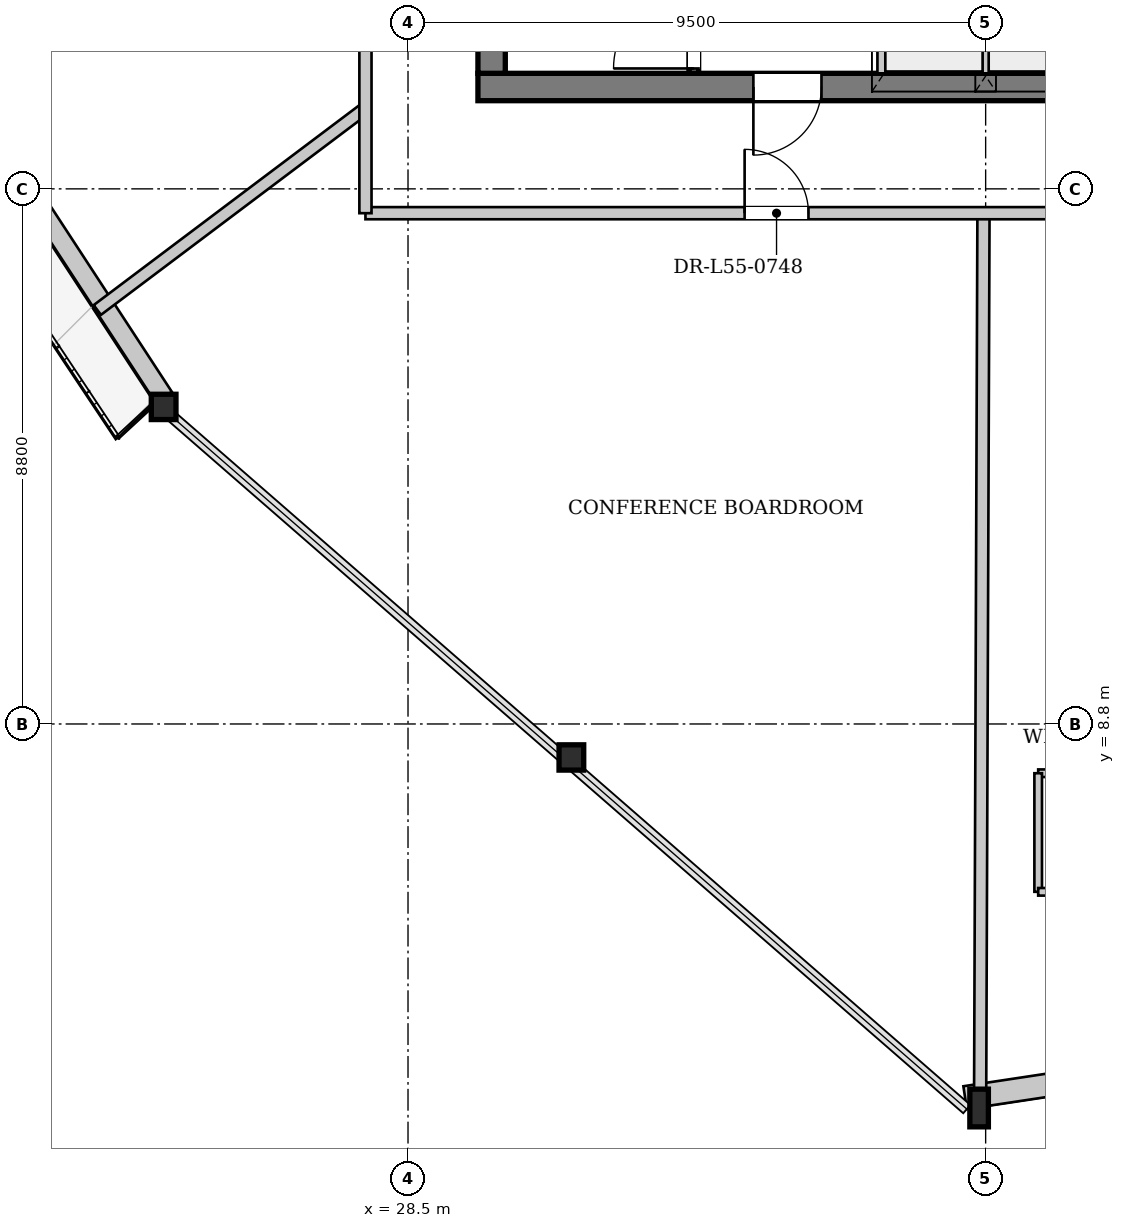
"""IFC4 building model, lengths in metres.
Left out: names, types, materials, properties, quantities, classifications, styles, units other than length and angle.
Written with IfcOpenShell. Run it as: python <this file> out.ifc"""

import sys

from ifc_helpers import new_model, si_unit, direction, frame, frame_2d, origin, origin_2d, place, context, subcontext, project, spatial, rectangle, i_section, extrude, source, transform, mapped, element, fill, save


model = new_model("IFC4")
c1 = context("Model", 3, precision=1e-05, world=origin(), true_north=direction((0.0, 1.0)))
c2 = subcontext(c1, "Body", "Model", "MODEL_VIEW")
j1 = project(units=[si_unit("LENGTHUNIT", "METRE"), si_unit("PLANEANGLEUNIT", "RADIAN")], contexts=[c1])
p1 = place(None, origin())
s1 = spatial("IfcSite", under=j1, at=p1, CompositionType="ELEMENT")
p2 = place(p1, origin())
s2 = spatial("IfcBuilding", under=s1, at=p2, CompositionType="ELEMENT")
p3 = place(p2, frame((0.0, 0.0, 209.6)))
s3 = spatial("IfcBuildingStorey", under=s2, at=p3, CompositionType="ELEMENT", Elevation=209.6)
m1 = source(origin(), c2, "Body", "SweptSolid", [
    extrude(i_section(OverallWidth=0.406, OverallDepth=0.416, WebThickness=0.027, FlangeThickness=0.042, at=origin_2d()), origin(), (0.0, 0.0, 1.0), 3.399),
])
p4 = place(p3, frame((24.347, 14.088, 0.0), z_axis=(0.078726710001, -0.043745042327, 0.995935980073), x_axis=(0.485710646607, 0.874119653007, 0.0)))
e1 = element("IfcColumn", 1, at=p4, inside=s3, PredefinedType="COLUMN", context=c2, shape_type="MappedRepresentation", body=[
    mapped(m1, transform((0.0, 0.0, 0.0), x_axis=(1.0, 0.0, 0.0), y_axis=(0.0, 1.0, 0.0), z_axis=(0.0, 0.0, 1.0), scale=1.0)),
])
m2 = source(origin(), c2, "Body", "SweptSolid", [
    extrude(i_section(OverallWidth=0.406, OverallDepth=0.416, WebThickness=0.027, FlangeThickness=0.042, at=origin_2d()), origin(), (0.0, 0.0, 1.0), 3.402),
])
p5 = place(p3, frame((31.019, 8.278, 0.0), z_axis=(0.098672919306, -0.016577050443, 0.994981837218), x_axis=(0.1656782175, 0.986179866072, 0.0)))
e2 = element("IfcColumn", 2, at=p5, inside=s3, PredefinedType="COLUMN", context=c2, shape_type="MappedRepresentation", body=[
    mapped(m2, transform((0.0, 0.0, 0.0), x_axis=(1.0, 0.0, 0.0), y_axis=(0.0, 1.0, 0.0), z_axis=(0.0, 0.0, 1.0), scale=1.0)),
])
m3 = source(origin(), c2, "Body", "SweptSolid", [
    extrude(i_section(OverallWidth=0.305, OverallDepth=0.62, WebThickness=0.021, FlangeThickness=0.04, at=origin_2d()), origin(), (0.0, 0.0, 1.0), 3.409),
])
p6 = place(p3, frame((37.691, 2.467, 0.0), z_axis=(0.118446662085, 0.010598613052, 0.992903851157), x_axis=(-0.089123966209, 0.996020541278, 0.0)))
e3 = element("IfcColumn", 3, at=p6, inside=s3, PredefinedType="COLUMN", context=c2, shape_type="MappedRepresentation", body=[
    mapped(m3, transform((0.0, 0.0, 0.0), x_axis=(1.0, 0.0, 0.0), y_axis=(0.0, 1.0, 0.0), z_axis=(0.0, 0.0, 1.0), scale=1.0)),
])
p7 = place(p3, frame((41.551, 3.243, 0.0), z_axis=(0.0, 0.0, 1.0), x_axis=(-0.988756700012, -0.149533234373, 0.0)))
e4 = element("IfcWall", 4, at=p7, inside=s3, PredefinedType="SOLIDWALL", context=c2, shape_type="SweptSolid", body=[
    extrude(rectangle(XDim=3.933, YDim=0.38, at=frame_2d((1.967, 0.0))), origin(), (0.0, 0.0, 1.0), 2.822),
])
p8 = place(p3, frame((24.481, 14.176, 0.0), z_axis=(0.0, 0.0, 1.0), x_axis=(-0.546955288252, 0.837161819873, 0.0)))
e5 = element("IfcWall", 5, at=p8, inside=s3, PredefinedType="SOLIDWALL", context=c2, shape_type="SweptSolid", body=[
    extrude(rectangle(XDim=17.695, YDim=0.32, at=frame_2d((8.848, 0.0))), origin(), (0.0, 0.0, 1.0), 2.822),
])
p9 = place(p8, frame((4.912, 0.0, 0.0)))
e6 = element("IfcOpeningElement", 6, at=p9, cuts=e5, PredefinedType="OPENING", context=c2, shape_type="SweptSolid", body=[
    extrude(rectangle(XDim=1.5, YDim=2.3, at=frame_2d((0.75, 1.15))), frame((0.0, 0.17, 0.0), z_axis=(0.0, -1.0, 0.0), x_axis=(1.0, 0.0, 0.0)), (0.0, 0.0, 1.0), 0.34),
])
p10 = place(p8, frame((11.794, 0.0, 0.352)))
e7 = element("IfcOpeningElement", 7, at=p10, cuts=e5, PredefinedType="OPENING", context=c2, shape_type="SweptSolid", body=[
    extrude(rectangle(XDim=2.6, YDim=2.35, at=frame_2d((1.3, 1.175))), frame((0.0, 0.17, 0.0), z_axis=(0.0, -1.0, 0.0), x_axis=(1.0, 0.0, 0.0)), (0.0, 0.0, 1.0), 0.34),
])
p11 = place(p3, frame((46.35, 19.275, 0.0), z_axis=(0.0, 0.0, 1.0), x_axis=(-1.0, 0.0, 0.0)))
e8 = element("IfcWall", 8, at=p11, inside=s3, PredefinedType="SHEAR", context=c2, shape_type="SweptSolid", body=[
    extrude(rectangle(XDim=16.7, YDim=0.45, at=frame_2d((8.35, 0.0))), origin(), (0.0, 0.0, 1.0), 3.33),
])
p12 = place(p11, frame((4.55, 0.0, 0.0)))
e9 = element("IfcOpeningElement", 9, at=p12, cuts=e8, PredefinedType="OPENING", context=c2, shape_type="SweptSolid", body=[
    extrude(rectangle(XDim=1.12, YDim=2.25, at=frame_2d((0.56, 1.125))), frame((0.0, 0.235, 0.0), z_axis=(0.0, -1.0, 0.0), x_axis=(1.0, 0.0, 0.0)), (0.0, 0.0, 1.0), 0.47),
])
p13 = place(p11, frame((11.05, 0.0, 0.0)))
e10 = element("IfcOpeningElement", 10, at=p13, cuts=e8, PredefinedType="OPENING", context=c2, shape_type="SweptSolid", body=[
    extrude(rectangle(XDim=1.12, YDim=2.25, at=frame_2d((0.56, 1.125))), frame((0.0, 0.235, 0.0), z_axis=(0.0, -1.0, 0.0), x_axis=(1.0, 0.0, 0.0)), (0.0, 0.0, 1.0), 0.47),
])
p14 = place(p3, frame((29.875, 19.5, 0.0), z_axis=(0.0, 0.0, 1.0), x_axis=(0.0, 1.0, 0.0)))
e11 = element("IfcWall", 11, at=p14, inside=s3, PredefinedType="SHEAR", context=c2, shape_type="SweptSolid", body=[
    extrude(rectangle(XDim=14.2, YDim=0.45, at=frame_2d((7.1, 0.0))), origin(), (0.0, 0.0, 1.0), 3.33),
])
p15 = place(p14, frame((7.42, 0.0, 0.0)))
e12 = element("IfcOpeningElement", 12, at=p15, cuts=e11, PredefinedType="OPENING", context=c2, shape_type="SweptSolid", body=[
    extrude(rectangle(XDim=1.6, YDim=2.2, at=frame_2d((0.8, 1.1))), frame((0.0, 0.235, 0.0), z_axis=(0.0, -1.0, 0.0), x_axis=(1.0, 0.0, 0.0)), (0.0, 0.0, 1.0), 0.47),
])
p16 = place(p3, frame((33.2, 19.5, 0.0), z_axis=(0.0, 0.0, 1.0), x_axis=(0.0, 1.0, 0.0)))
e13 = element("IfcWall", 13, at=p16, inside=s3, PredefinedType="PARTITIONING", context=c2, shape_type="SweptSolid", body=[
    extrude(rectangle(XDim=7.46, YDim=0.16, at=frame_2d((3.73, 0.0))), origin(), (0.0, 0.0, 1.0), 3.33),
])
p17 = place(p16, frame((0.08, 0.0, 0.0)))
e14 = element("IfcOpeningElement", 14, at=p17, cuts=e13, PredefinedType="OPENING", context=c2, shape_type="SweptSolid", body=[
    extrude(rectangle(XDim=1.32, YDim=2.2, at=frame_2d((0.66, 1.1))), frame((0.0, 0.09, 0.0), z_axis=(0.0, -1.0, 0.0), x_axis=(1.0, 0.0, 0.0)), (0.0, 0.0, 1.0), 0.18),
])
p18 = place(p3, frame((36.3, 19.5, 0.0), z_axis=(0.0, 0.0, 1.0), x_axis=(0.0, 1.0, 0.0)))
e15 = element("IfcWall", 15, at=p18, inside=s3, PredefinedType="PARTITIONING", context=c2, shape_type="SweptSolid", body=[
    extrude(rectangle(XDim=4.78, YDim=0.16, at=frame_2d((2.39, 0.0))), origin(), (0.0, 0.0, 1.0), 3.33),
])
p19 = place(p18, frame((0.6, 0.0, 0.0)))
e16 = element("IfcOpeningElement", 16, at=p19, cuts=e15, PredefinedType="OPENING", context=c2, shape_type="SweptSolid", body=[
    extrude(rectangle(XDim=1.2, YDim=2.2, at=frame_2d((0.6, 1.1))), frame((0.0, 0.09, 0.0), z_axis=(0.0, -1.0, 0.0), x_axis=(1.0, 0.0, 0.0)), (0.0, 0.0, 1.0), 0.18),
])
p20 = place(p18, frame((2.65, 0.0, 0.0)))
e17 = element("IfcOpeningElement", 17, at=p20, cuts=e15, PredefinedType="OPENING", context=c2, shape_type="SweptSolid", body=[
    extrude(rectangle(XDim=0.95, YDim=2.1, at=frame_2d((0.475, 1.05))), frame((0.0, 0.09, 0.0), z_axis=(0.0, -1.0, 0.0), x_axis=(1.0, 0.0, 0.0)), (0.0, 0.0, 1.0), 0.18),
])
p21 = place(p3, frame((38.0, 19.5, 0.0), z_axis=(0.0, 0.0, 1.0), x_axis=(0.0, 1.0, 0.0)))
e18 = element("IfcWall", 18, at=p21, inside=s3, PredefinedType="PARTITIONING", context=c2, shape_type="SweptSolid", body=[
    extrude(rectangle(XDim=2.46, YDim=0.125, at=frame_2d((1.23, 0.0))), origin(), (0.0, 0.0, 1.0), 3.33),
])
p22 = place(p3, frame((27.8, 18.926, 0.0), z_axis=(0.0, 0.0, 1.0), x_axis=(-0.799112551023, -0.60118144582, 0.0)))
e19 = element("IfcWall", 19, at=p22, inside=s3, PredefinedType="PARTITIONING", context=c2, shape_type="SweptSolid", body=[
    extrude(rectangle(XDim=5.519, YDim=0.2, at=frame_2d((2.759, 0.0))), origin(), (0.0, 0.0, 1.0), 3.33),
])
p23 = place(p3, frame((37.964, 17.2, 0.0), z_axis=(0.0, 0.0, 1.0), x_axis=(-0.003794344368, -0.999992801449, 0.0)))
e20 = element("IfcWall", 20, at=p23, inside=s3, PredefinedType="PARTITIONING", context=c2, shape_type="SweptSolid", body=[
    extrude(rectangle(XDim=14.67, YDim=0.2, at=frame_2d((7.335, 0.0))), origin(), (0.0, 0.0, 1.0), 2.925),
])
p24 = place(p3, frame((41.264, 7.99, 0.0), z_axis=(0.0, 0.0, 1.0), x_axis=(-1.0, 0.0, 0.0)))
e21 = element("IfcWall", 21, at=p24, inside=s3, PredefinedType="PARTITIONING", context=c2, shape_type="SweptSolid", body=[
    extrude(rectangle(XDim=2.4, YDim=0.125, at=frame_2d((1.2, 0.0))), origin(), (0.0, 0.0, 1.0), 3.33),
])
p25 = place(p3, frame((38.864, 7.99, 0.0), z_axis=(0.0, 0.0, 1.0), x_axis=(0.0, -1.0, 0.0)))
e22 = element("IfcWall", 22, at=p25, inside=s3, PredefinedType="PARTITIONING", context=c2, shape_type="SweptSolid", body=[
    extrude(rectangle(XDim=1.95, YDim=0.125, at=frame_2d((0.975, 0.0))), origin(), (0.0, 0.0, 1.0), 3.33),
])
p26 = place(p3, frame((38.864, 6.04, 0.0), z_axis=(0.0, 0.0, 1.0), x_axis=(1.0, 0.0, 0.0)))
e23 = element("IfcWall", 23, at=p26, inside=s3, PredefinedType="PARTITIONING", context=c2, shape_type="SweptSolid", body=[
    extrude(rectangle(XDim=2.4, YDim=0.125, at=frame_2d((1.2, 0.0))), origin(), (0.0, 0.0, 1.0), 3.33),
])
p27 = place(p3, frame((27.8, 17.2, 0.0), z_axis=(0.0, 0.0, 1.0), x_axis=(1.0, 0.0, 0.0)))
e24 = element("IfcWall", 24, at=p27, inside=s3, PredefinedType="PARTITIONING", context=c2, shape_type="SweptSolid", body=[
    extrude(rectangle(XDim=20.4, YDim=0.2, at=frame_2d((10.2, 0.0))), origin(), (0.0, 0.0, 1.0), 3.33),
])
p28 = place(p27, frame((19.05, 0.0, 0.0)))
e25 = element("IfcOpeningElement", 25, at=p28, cuts=e24, PredefinedType="OPENING", context=c2, shape_type="SweptSolid", body=[
    extrude(rectangle(XDim=1.05, YDim=2.2, at=frame_2d((0.525, 1.1))), frame((0.0, 0.11, 0.0), z_axis=(0.0, -1.0, 0.0), x_axis=(1.0, 0.0, 0.0)), (0.0, 0.0, 1.0), 0.22),
])
p29 = place(p27, frame((6.236, 0.0, 0.0)))
e26 = element("IfcOpeningElement", 26, at=p29, cuts=e24, PredefinedType="OPENING", context=c2, shape_type="SweptSolid", body=[
    extrude(rectangle(XDim=1.05, YDim=2.2, at=frame_2d((0.525, 1.1))), frame((0.0, 0.11, 0.0), z_axis=(0.0, -1.0, 0.0), x_axis=(1.0, 0.0, 0.0)), (0.0, 0.0, 1.0), 0.22),
])
p30 = place(p27, frame((13.458, 0.0, 0.0)))
e27 = element("IfcOpeningElement", 27, at=p30, cuts=e24, PredefinedType="OPENING", context=c2, shape_type="SweptSolid", body=[
    extrude(rectangle(XDim=1.05, YDim=2.2, at=frame_2d((0.525, 1.1))), frame((0.0, 0.11, 0.0), z_axis=(0.0, -1.0, 0.0), x_axis=(1.0, 0.0, 0.0)), (0.0, 0.0, 1.0), 0.22),
])
p31 = place(p3, frame((27.8, 17.2, 0.0), z_axis=(0.0, 0.0, 1.0), x_axis=(0.0, 1.0, 0.0)))
e28 = element("IfcWall", 28, at=p31, inside=s3, PredefinedType="PARTITIONING", context=c2, shape_type="SweptSolid", body=[
    extrude(rectangle(XDim=18.8, YDim=0.2, at=frame_2d((9.4, 0.0))), origin(), (0.0, 0.0, 1.0), 3.33),
])
p32 = place(p31, frame((6.181, 0.0, 0.0)))
e29 = element("IfcOpeningElement", 29, at=p32, cuts=e28, PredefinedType="OPENING", context=c2, shape_type="SweptSolid", body=[
    extrude(rectangle(XDim=1.05, YDim=2.2, at=frame_2d((0.525, 1.1))), frame((0.0, 0.11, 0.0), z_axis=(0.0, -1.0, 0.0), x_axis=(1.0, 0.0, 0.0)), (0.0, 0.0, 1.0), 0.22),
])
m4 = source(origin(), c2, "Body", "SweptSolid", [
    extrude(rectangle(XDim=1.12, YDim=2.25, at=frame_2d((0.56, 1.125))), frame((0.0, 0.025, 0.0), z_axis=(0.0, -1.0, 0.0), x_axis=(1.0, 0.0, 0.0)), (0.0, 0.0, 1.0), 0.05),
])
p33 = place(p13, origin())
e30 = element("IfcDoor", 30, at=p33, inside=s3, OperationType="SINGLE_SWING_RIGHT", PredefinedType="DOOR", context=c2, shape_type="MappedRepresentation", body=[
    mapped(m4, transform((0.0, 0.0, 0.0), x_axis=(1.0, 0.0, 0.0), y_axis=(0.0, 1.0, 0.0), z_axis=(0.0, 0.0, 1.0), scale=1.0)),
])
fill(e10, e30)
m5 = source(origin(), c2, "Body", "SweptSolid", [
    extrude(rectangle(XDim=1.32, YDim=2.2, at=frame_2d((0.66, 1.1))), frame((0.0, 0.025, 0.0), z_axis=(0.0, -1.0, 0.0), x_axis=(1.0, 0.0, 0.0)), (0.0, 0.0, 1.0), 0.05),
])
p34 = place(p17, origin())
e31 = element("IfcDoor", 31, at=p34, inside=s3, OperationType="SINGLE_SWING_LEFT", PredefinedType="DOOR", context=c2, shape_type="MappedRepresentation", body=[
    mapped(m5, transform((0.0, 0.0, 0.0), x_axis=(1.0, 0.0, 0.0), y_axis=(0.0, 1.0, 0.0), z_axis=(0.0, 0.0, 1.0), scale=1.0)),
])
fill(e14, e31)
m6 = source(origin(), c2, "Body", "SweptSolid", [
    extrude(rectangle(XDim=1.05, YDim=2.2, at=frame_2d((0.525, 1.1))), frame((0.0, 0.025, 0.0), z_axis=(0.0, -1.0, 0.0), x_axis=(1.0, 0.0, 0.0)), (0.0, 0.0, 1.0), 0.05),
])
p35 = place(p29, origin())
e32 = element("IfcDoor", 32, at=p35, inside=s3, OperationType="SINGLE_SWING_LEFT", PredefinedType="DOOR", context=c2, shape_type="MappedRepresentation", body=[
    mapped(m6, transform((0.0, 0.0, 0.0), x_axis=(1.0, 0.0, 0.0), y_axis=(0.0, 1.0, 0.0), z_axis=(0.0, 0.0, 1.0), scale=1.0)),
])
fill(e26, e32)
save(model, sys.argv[1])
